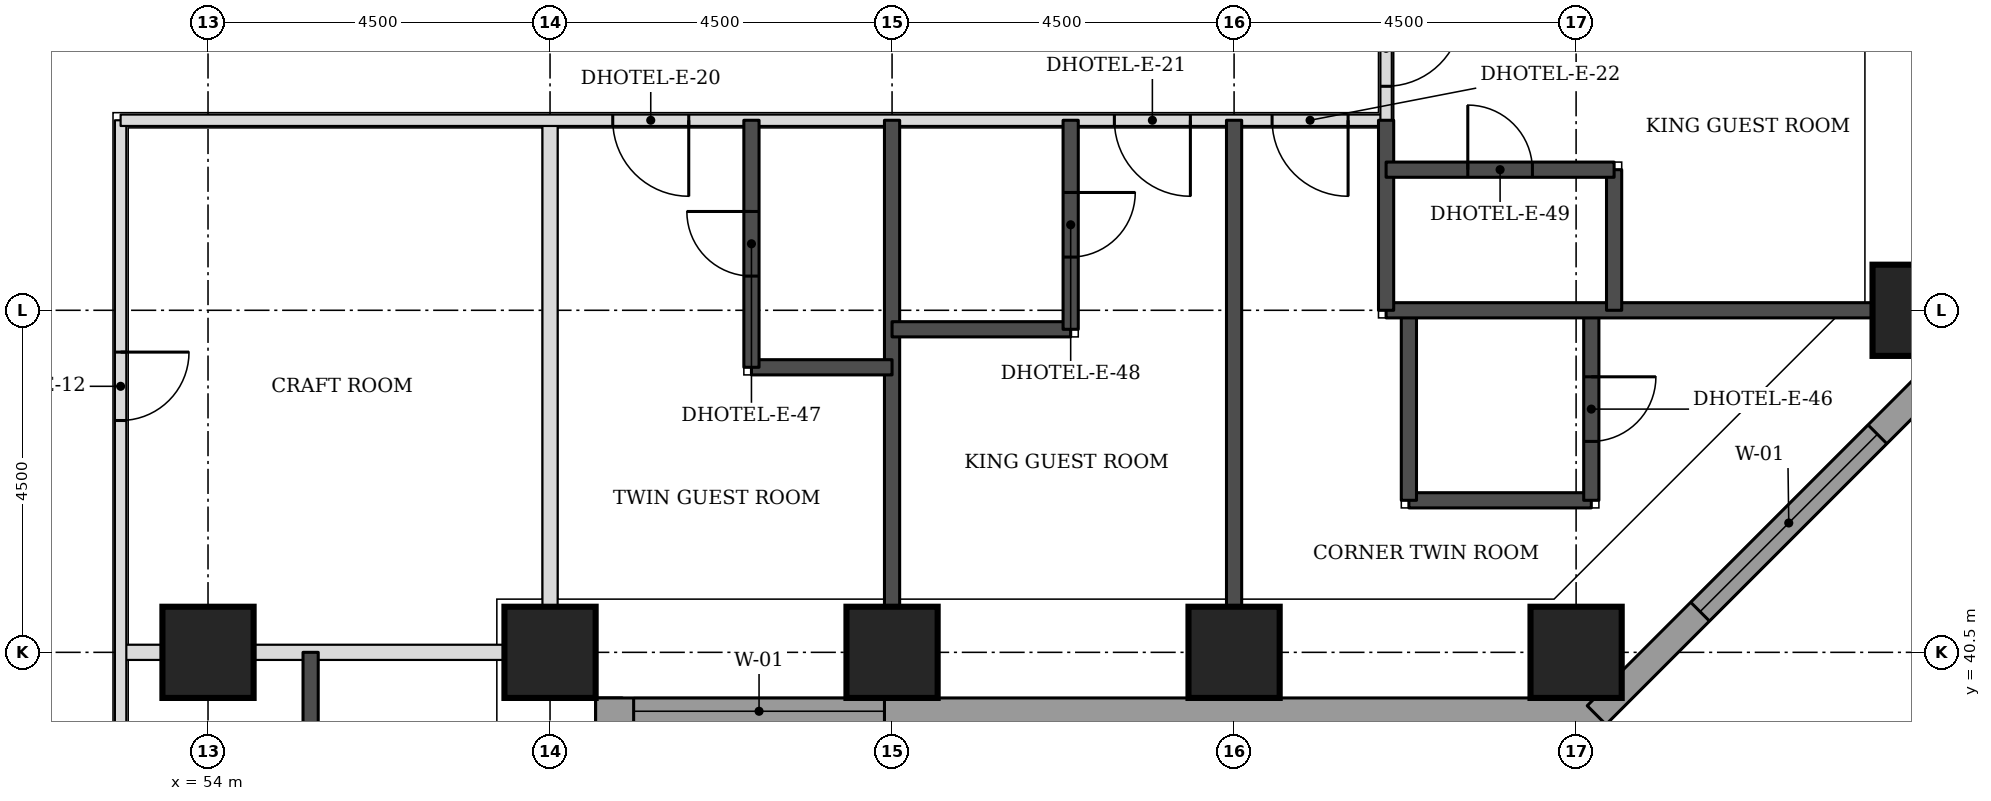
"""IFC4 building model, lengths in metres.
Left out: names, types, materials, properties, quantities, classifications, styles, units other than length and angle.
Written with IfcOpenShell. Run it as: python <this file> out.ifc"""

import sys

from ifc_helpers import new_model, si_unit, direction, frame, frame_2d, origin, origin_2d, place, context, subcontext, project, spatial, rectangle, extrude, element, fill, save


model = new_model("IFC4")
c1 = context("Model", 3, precision=1e-05, world=origin(), true_north=direction((0.0, 1.0)))
c2 = subcontext(c1, "Body", "Model", "MODEL_VIEW")
j1 = project(units=[si_unit("LENGTHUNIT", "METRE"), si_unit("PLANEANGLEUNIT", "RADIAN")], contexts=[c1])
p1 = place(None, origin())
s1 = spatial("IfcSite", under=j1, at=p1, CompositionType="ELEMENT")
p2 = place(p1, origin())
s2 = spatial("IfcBuilding", under=s1, at=p2, CompositionType="ELEMENT")
p3 = place(p2, frame((0.0, 0.0, 62.7)))
s3 = spatial("IfcBuildingStorey", under=s2, at=p3, CompositionType="ELEMENT", Elevation=62.7)
for number, where, z_axis, x_axis in (
    (1, (54.0, 40.5, 0.0), (0.0, 0.0, 1.0), (1.0, 0.0, 0.0)),
    (2, (58.5, 40.5, 0.0), (0.0, 0.0, 1.0), (1.0, 0.0, 0.0)),
    (3, (63.0, 40.5, 0.0), (0.0, 0.0, 1.0), (1.0, 0.0, 0.0)),
    (4, (67.5, 40.5, 0.0), (0.0, 0.0, 1.0), (1.0, 0.0, 0.0)),
    (5, (72.0, 40.5, 0.0), (0.0, 0.0, 1.0), (1.0, 0.0, 0.0)),
    (6, (76.5, 45.0, 0.0), (0.0, 0.0, 1.0), (1.0, 0.0, 0.0)),
):
    element("IfcColumn", number, at=place(p3, frame(where, z_axis=z_axis, x_axis=x_axis)), inside=s3, PredefinedType="COLUMN", context=c2, shape_type="SweptSolid", body=[
        extrude(rectangle(XDim=1.2, YDim=1.2, at=origin_2d()), origin(), (0.0, 0.0, 1.0), 3.3),
    ])
p4 = place(p3, frame((59.275, 22.106, 0.0), z_axis=(0.0, 0.0, 1.0), x_axis=(0.0, 1.0, 0.0)))
e7 = element("IfcWall", 7, at=p4, inside=s3, PredefinedType="STANDARD", context=c2, shape_type="SweptSolid", body=[
    extrude(rectangle(XDim=17.793, YDim=0.35, at=frame_2d((8.897, 0.0))), origin(), (0.0, 0.0, 1.0), 3.055),
])
p5 = place(p4, frame((5.493, 0.0, 0.8)))
e8 = element("IfcOpeningElement", 8, at=p5, cuts=e7, PredefinedType="OPENING", context=c2, shape_type="SweptSolid", body=[
    extrude(rectangle(XDim=3.3, YDim=1.5, at=frame_2d((1.65, 0.75))), frame((0.0, 0.185, 0.0), z_axis=(0.0, -1.0, 0.0), x_axis=(1.0, 0.0, 0.0)), (0.0, 0.0, 1.0), 0.37),
])
p6 = place(p4, frame((13.993, 0.0, 0.8)))
e9 = element("IfcOpeningElement", 9, at=p6, cuts=e7, PredefinedType="OPENING", context=c2, shape_type="SweptSolid", body=[
    extrude(rectangle(XDim=3.3, YDim=1.5, at=frame_2d((1.65, 0.75))), frame((0.0, 0.185, 0.0), z_axis=(0.0, -1.0, 0.0), x_axis=(1.0, 0.0, 0.0)), (0.0, 0.0, 1.0), 0.37),
])
p7 = place(p3, frame((59.1, 39.725, 0.0), z_axis=(0.0, 0.0, 1.0), x_axis=(1.0, 0.0, 0.0)))
e10 = element("IfcWall", 10, at=p7, inside=s3, PredefinedType="STANDARD", context=c2, shape_type="SweptSolid", body=[
    extrude(rectangle(XDim=13.293, YDim=0.35, at=frame_2d((6.647, 0.0))), origin(), (0.0, 0.0, 1.0), 3.055),
])
p8 = place(p7, frame((0.5, 0.0, 0.8)))
e11 = element("IfcOpeningElement", 11, at=p8, cuts=e10, PredefinedType="OPENING", context=c2, shape_type="SweptSolid", body=[
    extrude(rectangle(XDim=3.3, YDim=1.5, at=frame_2d((1.65, 0.75))), frame((0.0, 0.185, 0.0), z_axis=(0.0, -1.0, 0.0), x_axis=(1.0, 0.0, 0.0)), (0.0, 0.0, 1.0), 0.37),
])
p9 = place(p3, frame((72.27, 39.674, 0.0), z_axis=(0.0, 0.0, 1.0), x_axis=(0.707106781187, 0.707106781187, 0.0)))
e12 = element("IfcWall", 12, at=p9, inside=s3, PredefinedType="STANDARD", context=c2, shape_type="SweptSolid", body=[
    extrude(rectangle(XDim=7.151, YDim=0.35, at=frame_2d((3.576, 0.0))), origin(), (0.0, 0.0, 1.0), 3.055),
])
p10 = place(p9, frame((1.926, 0.0, 0.8)))
e13 = element("IfcOpeningElement", 13, at=p10, cuts=e12, PredefinedType="OPENING", context=c2, shape_type="SweptSolid", body=[
    extrude(rectangle(XDim=3.3, YDim=1.5, at=frame_2d((1.65, 0.75))), frame((0.0, 0.185, 0.0), z_axis=(0.0, -1.0, 0.0), x_axis=(1.0, 0.0, 0.0)), (0.0, 0.0, 1.0), 0.37),
])
p11 = place(p3, frame((52.85, 40.5, 0.0), z_axis=(0.0, 0.0, 1.0), x_axis=(1.0, 0.0, 0.0)))
e14 = element("IfcWall", 14, at=p11, inside=s3, PredefinedType="PARTITIONING", context=c2, shape_type="SweptSolid", body=[
    extrude(rectangle(XDim=5.05, YDim=0.2, at=frame_2d((2.525, 0.0))), origin(), (0.0, 0.0, 1.0), 2.33),
])
p12 = place(p3, frame((58.5, 41.1, 0.0), z_axis=(0.0, 0.0, 1.0), x_axis=(0.0, 1.0, 0.0)))
e15 = element("IfcWall", 15, at=p12, inside=s3, PredefinedType="PARTITIONING", context=c2, shape_type="SweptSolid", body=[
    extrude(rectangle(XDim=6.4, YDim=0.2, at=frame_2d((3.2, 0.0))), origin(), (0.0, 0.0, 1.0), 3.08),
])
p13 = place(p3, frame((52.85, 25.15, 0.0), z_axis=(0.0, 0.0, 1.0), x_axis=(0.0, 1.0, 0.0)))
e16 = element("IfcWall", 16, at=p13, inside=s3, PredefinedType="PARTITIONING", context=c2, shape_type="SweptSolid", body=[
    extrude(rectangle(XDim=22.35, YDim=0.15, at=frame_2d((11.175, 0.0))), origin(), (0.0, 0.0, 1.0), 3.08),
])
p14 = place(p13, frame((0.347, 0.0, 0.0)))
e17 = element("IfcOpeningElement", 17, at=p14, cuts=e16, PredefinedType="OPENING", context=c2, shape_type="SweptSolid", body=[
    extrude(rectangle(XDim=1.0, YDim=2.1, at=frame_2d((0.5, 1.05))), frame((0.0, 0.085, 0.0), z_axis=(0.0, -1.0, 0.0), x_axis=(1.0, 0.0, 0.0)), (0.0, 0.0, 1.0), 0.17),
])
p15 = place(p13, frame((7.325, 0.0, 0.0)))
e18 = element("IfcOpeningElement", 18, at=p15, cuts=e16, PredefinedType="OPENING", context=c2, shape_type="SweptSolid", body=[
    extrude(rectangle(XDim=1.0, YDim=2.1, at=frame_2d((0.5, 1.05))), frame((0.0, 0.085, 0.0), z_axis=(0.0, -1.0, 0.0), x_axis=(1.0, 0.0, 0.0)), (0.0, 0.0, 1.0), 0.17),
])
p16 = place(p13, frame((11.675, 0.0, 0.0)))
e19 = element("IfcOpeningElement", 19, at=p16, cuts=e16, PredefinedType="OPENING", context=c2, shape_type="SweptSolid", body=[
    extrude(rectangle(XDim=1.0, YDim=2.1, at=frame_2d((0.5, 1.05))), frame((0.0, 0.085, 0.0), z_axis=(0.0, -1.0, 0.0), x_axis=(1.0, 0.0, 0.0)), (0.0, 0.0, 1.0), 0.17),
])
p17 = place(p13, frame((18.4, 0.0, 0.0)))
e20 = element("IfcOpeningElement", 20, at=p17, cuts=e16, PredefinedType="OPENING", context=c2, shape_type="SweptSolid", body=[
    extrude(rectangle(XDim=0.9, YDim=2.1, at=frame_2d((0.45, 1.05))), frame((0.0, 0.085, 0.0), z_axis=(0.0, -1.0, 0.0), x_axis=(1.0, 0.0, 0.0)), (0.0, 0.0, 1.0), 0.17),
])
p18 = place(p3, frame((52.85, 47.5, 0.0), z_axis=(0.0, 0.0, 1.0), x_axis=(1.0, 0.0, 0.0)))
e21 = element("IfcWall", 21, at=p18, inside=s3, PredefinedType="PARTITIONING", context=c2, shape_type="SweptSolid", body=[
    extrude(rectangle(XDim=16.65, YDim=0.15, at=frame_2d((8.325, 0.0))), origin(), (0.0, 0.0, 1.0), 3.08),
])
p19 = place(p18, frame((13.075, 0.0, 0.0)))
e22 = element("IfcOpeningElement", 22, at=p19, cuts=e21, PredefinedType="OPENING", context=c2, shape_type="SweptSolid", body=[
    extrude(rectangle(XDim=1.0, YDim=2.1, at=frame_2d((0.5, 1.05))), frame((0.0, 0.085, 0.0), z_axis=(0.0, -1.0, 0.0), x_axis=(1.0, 0.0, 0.0)), (0.0, 0.0, 1.0), 0.17),
])
p20 = place(p18, frame((6.475, 0.0, 0.0)))
e23 = element("IfcOpeningElement", 23, at=p20, cuts=e21, PredefinedType="OPENING", context=c2, shape_type="SweptSolid", body=[
    extrude(rectangle(XDim=1.0, YDim=2.1, at=frame_2d((0.5, 1.05))), frame((0.0, 0.085, 0.0), z_axis=(0.0, -1.0, 0.0), x_axis=(1.0, 0.0, 0.0)), (0.0, 0.0, 1.0), 0.17),
])
p21 = place(p18, frame((15.15, 0.0, 0.0)))
e24 = element("IfcOpeningElement", 24, at=p21, cuts=e21, PredefinedType="OPENING", context=c2, shape_type="SweptSolid", body=[
    extrude(rectangle(XDim=1.0, YDim=2.1, at=frame_2d((0.5, 1.05))), frame((0.0, 0.085, 0.0), z_axis=(0.0, -1.0, 0.0), x_axis=(1.0, 0.0, 0.0)), (0.0, 0.0, 1.0), 0.17),
])
p22 = place(p3, frame((69.5, 47.5, 0.0), z_axis=(0.0, 0.0, 1.0), x_axis=(0.0, 1.0, 0.0)))
e25 = element("IfcWall", 25, at=p22, inside=s3, PredefinedType="PARTITIONING", context=c2, shape_type="SweptSolid", body=[
    extrude(rectangle(XDim=26.5, YDim=0.15, at=frame_2d((13.25, 0.0))), origin(), (0.0, 0.0, 1.0), 3.08),
])
p23 = place(p22, frame((25.053, 0.0, 0.0)))
e26 = element("IfcOpeningElement", 26, at=p23, cuts=e25, PredefinedType="OPENING", context=c2, shape_type="SweptSolid", body=[
    extrude(rectangle(XDim=1.0, YDim=2.1, at=frame_2d((0.5, 1.05))), frame((0.0, 0.085, 0.0), z_axis=(0.0, -1.0, 0.0), x_axis=(1.0, 0.0, 0.0)), (0.0, 0.0, 1.0), 0.17),
])
p24 = place(p22, frame((13.775, 0.0, 0.0)))
e27 = element("IfcOpeningElement", 27, at=p24, cuts=e25, PredefinedType="OPENING", context=c2, shape_type="SweptSolid", body=[
    extrude(rectangle(XDim=1.0, YDim=2.1, at=frame_2d((0.5, 1.05))), frame((0.0, 0.085, 0.0), z_axis=(0.0, -1.0, 0.0), x_axis=(1.0, 0.0, 0.0)), (0.0, 0.0, 1.0), 0.17),
])
p25 = place(p22, frame((7.65, 0.0, 0.0)))
e28 = element("IfcOpeningElement", 28, at=p25, cuts=e25, PredefinedType="OPENING", context=c2, shape_type="SweptSolid", body=[
    extrude(rectangle(XDim=1.1, YDim=2.1, at=frame_2d((0.55, 1.05))), frame((0.0, 0.085, 0.0), z_axis=(0.0, -1.0, 0.0), x_axis=(1.0, 0.0, 0.0)), (0.0, 0.0, 1.0), 0.17),
])
p26 = place(p22, frame((0.447, 0.0, 0.0)))
e29 = element("IfcOpeningElement", 29, at=p26, cuts=e25, PredefinedType="OPENING", context=c2, shape_type="SweptSolid", body=[
    extrude(rectangle(XDim=1.0, YDim=2.1, at=frame_2d((0.5, 1.05))), frame((0.0, 0.085, 0.0), z_axis=(0.0, -1.0, 0.0), x_axis=(1.0, 0.0, 0.0)), (0.0, 0.0, 1.0), 0.17),
])
p27 = place(p3, frame((55.35, 38.65, 0.0), z_axis=(0.0, 0.0, 1.0), x_axis=(0.0, 1.0, 0.0)))
e30 = element("IfcWall", 30, at=p27, inside=s3, PredefinedType="SOLIDWALL", context=c2, shape_type="SweptSolid", body=[
    extrude(rectangle(XDim=1.85, YDim=0.2, at=frame_2d((0.925, 0.0))), origin(), (0.0, 0.0, 1.0), 3.08),
])
for number, where, z_axis, x_axis in (
    (31, (63.0, 41.1, 0.0), (0.0, 0.0, 1.0), (0.0, 1.0, 0.0)),
    (32, (67.5, 41.1, 0.0), (0.0, 0.0, 1.0), (0.0, 1.0, 0.0)),
):
    element("IfcWall", number, at=place(p3, frame(where, z_axis=z_axis, x_axis=x_axis)), inside=s3, PredefinedType="SOLIDWALL", context=c2, shape_type="SweptSolid", body=[
        extrude(rectangle(XDim=6.4, YDim=0.2, at=frame_2d((3.2, 0.0))), origin(), (0.0, 0.0, 1.0), 3.08),
    ])
p28 = place(p3, frame((69.8, 42.5, 0.0), z_axis=(0.0, 0.0, 1.0), x_axis=(1.0, 0.0, 0.0)))
e33 = element("IfcWall", 33, at=p28, inside=s3, PredefinedType="SOLIDWALL", context=c2, shape_type="SweptSolid", body=[
    extrude(rectangle(XDim=2.4, YDim=0.2, at=frame_2d((1.2, 0.0))), origin(), (0.0, 0.0, 1.0), 3.08),
])
p29 = place(p3, frame((69.8, 42.5, 0.0), z_axis=(0.0, 0.0, 1.0), x_axis=(0.0, 1.0, 0.0)))
e34 = element("IfcWall", 34, at=p29, inside=s3, PredefinedType="SOLIDWALL", context=c2, shape_type="SweptSolid", body=[
    extrude(rectangle(XDim=2.5, YDim=0.2, at=frame_2d((1.25, 0.0))), origin(), (0.0, 0.0, 1.0), 3.08),
])
p30 = place(p3, frame((72.2, 42.5, 0.0), z_axis=(0.0, 0.0, 1.0), x_axis=(0.0, 1.0, 0.0)))
e35 = element("IfcWall", 35, at=p30, inside=s3, PredefinedType="SOLIDWALL", context=c2, shape_type="SweptSolid", body=[
    extrude(rectangle(XDim=2.5, YDim=0.2, at=frame_2d((1.25, 0.0))), origin(), (0.0, 0.0, 1.0), 3.08),
])
p31 = place(p30, frame((0.775, 0.0, 0.0)))
e36 = element("IfcOpeningElement", 36, at=p31, cuts=e35, PredefinedType="OPENING", context=c2, shape_type="SweptSolid", body=[
    extrude(rectangle(XDim=0.85, YDim=2.1, at=frame_2d((0.425, 1.05))), frame((0.0, 0.11, 0.0), z_axis=(0.0, -1.0, 0.0), x_axis=(1.0, 0.0, 0.0)), (0.0, 0.0, 1.0), 0.22),
])
p32 = place(p3, frame((61.15, 44.25, 0.0), z_axis=(0.0, 0.0, 1.0), x_axis=(1.0, 0.0, 0.0)))
e37 = element("IfcWall", 37, at=p32, inside=s3, PredefinedType="SOLIDWALL", context=c2, shape_type="SweptSolid", body=[
    extrude(rectangle(XDim=1.85, YDim=0.2, at=frame_2d((0.925, 0.0))), origin(), (0.0, 0.0, 1.0), 3.08),
])
p33 = place(p3, frame((61.15, 44.25, 0.0), z_axis=(0.0, 0.0, 1.0), x_axis=(0.0, 1.0, 0.0)))
e38 = element("IfcWall", 38, at=p33, inside=s3, PredefinedType="SOLIDWALL", context=c2, shape_type="SweptSolid", body=[
    extrude(rectangle(XDim=3.25, YDim=0.2, at=frame_2d((1.625, 0.0))), origin(), (0.0, 0.0, 1.0), 3.08),
])
p34 = place(p33, frame((1.2, 0.0, 0.0)))
e39 = element("IfcOpeningElement", 39, at=p34, cuts=e38, PredefinedType="OPENING", context=c2, shape_type="SweptSolid", body=[
    extrude(rectangle(XDim=0.85, YDim=2.1, at=frame_2d((0.425, 1.05))), frame((0.0, 0.11, 0.0), z_axis=(0.0, -1.0, 0.0), x_axis=(1.0, 0.0, 0.0)), (0.0, 0.0, 1.0), 0.22),
])
p35 = place(p3, frame((63.0, 44.75, 0.0), z_axis=(0.0, 0.0, 1.0), x_axis=(1.0, 0.0, 0.0)))
e40 = element("IfcWall", 40, at=p35, inside=s3, PredefinedType="SOLIDWALL", context=c2, shape_type="SweptSolid", body=[
    extrude(rectangle(XDim=2.35, YDim=0.2, at=frame_2d((1.175, 0.0))), origin(), (0.0, 0.0, 1.0), 3.08),
])
p36 = place(p3, frame((65.35, 44.75, 0.0), z_axis=(0.0, 0.0, 1.0), x_axis=(0.0, 1.0, 0.0)))
e41 = element("IfcWall", 41, at=p36, inside=s3, PredefinedType="SOLIDWALL", context=c2, shape_type="SweptSolid", body=[
    extrude(rectangle(XDim=2.75, YDim=0.2, at=frame_2d((1.375, 0.0))), origin(), (0.0, 0.0, 1.0), 3.08),
])
p37 = place(p36, frame((0.95, 0.0, 0.0)))
e42 = element("IfcOpeningElement", 42, at=p37, cuts=e41, PredefinedType="OPENING", context=c2, shape_type="SweptSolid", body=[
    extrude(rectangle(XDim=0.85, YDim=2.1, at=frame_2d((0.425, 1.05))), frame((0.0, 0.11, 0.0), z_axis=(0.0, -1.0, 0.0), x_axis=(1.0, 0.0, 0.0)), (0.0, 0.0, 1.0), 0.22),
])
p38 = place(p3, frame((69.5, 45.0, 0.0), z_axis=(0.0, 0.0, 1.0), x_axis=(1.0, 0.0, 0.0)))
e43 = element("IfcWall", 43, at=p38, inside=s3, PredefinedType="SOLIDWALL", context=c2, shape_type="SweptSolid", body=[
    extrude(rectangle(XDim=6.4, YDim=0.2, at=frame_2d((3.2, 0.0))), origin(), (0.0, 0.0, 1.0), 3.08),
])
p39 = place(p3, frame((69.5, 45.0, 0.0), z_axis=(0.0, 0.0, 1.0), x_axis=(0.0, 1.0, 0.0)))
e44 = element("IfcWall", 44, at=p39, inside=s3, PredefinedType="SOLIDWALL", context=c2, shape_type="SweptSolid", body=[
    extrude(rectangle(XDim=2.5, YDim=0.2, at=frame_2d((1.25, 0.0))), origin(), (0.0, 0.0, 1.0), 3.08),
])
p40 = place(p3, frame((72.5, 45.0, 0.0), z_axis=(0.0, 0.0, 1.0), x_axis=(0.0, 1.0, 0.0)))
e45 = element("IfcWall", 45, at=p40, inside=s3, PredefinedType="SOLIDWALL", context=c2, shape_type="SweptSolid", body=[
    extrude(rectangle(XDim=1.85, YDim=0.2, at=frame_2d((0.925, 0.0))), origin(), (0.0, 0.0, 1.0), 3.08),
])
p41 = place(p3, frame((69.5, 46.85, 0.0), z_axis=(0.0, 0.0, 1.0), x_axis=(1.0, 0.0, 0.0)))
e46 = element("IfcWall", 46, at=p41, inside=s3, PredefinedType="SOLIDWALL", context=c2, shape_type="SweptSolid", body=[
    extrude(rectangle(XDim=3.0, YDim=0.2, at=frame_2d((1.5, 0.0))), origin(), (0.0, 0.0, 1.0), 3.08),
])
p42 = place(p41, frame((1.075, 0.0, 0.0)))
e47 = element("IfcOpeningElement", 47, at=p42, cuts=e46, PredefinedType="OPENING", context=c2, shape_type="SweptSolid", body=[
    extrude(rectangle(XDim=0.85, YDim=2.1, at=frame_2d((0.425, 1.05))), frame((0.0, 0.11, 0.0), z_axis=(0.0, -1.0, 0.0), x_axis=(1.0, 0.0, 0.0)), (0.0, 0.0, 1.0), 0.22),
])
p43 = place(p8, origin())
e48 = element("IfcWindow", 48, at=p43, inside=s3, PartitioningType="SINGLE_PANEL", PredefinedType="WINDOW", context=c2, shape_type="SweptSolid", body=[
    extrude(rectangle(XDim=3.3, YDim=1.5, at=frame_2d((1.65, 0.75))), frame((0.0, 0.085, 0.0), z_axis=(0.0, -1.0, 0.0), x_axis=(1.0, 0.0, 0.0)), (0.0, 0.0, 1.0), 0.06),
])
fill(e11, e48)
p44 = place(p10, origin())
e49 = element("IfcWindow", 49, at=p44, inside=s3, PartitioningType="SINGLE_PANEL", PredefinedType="WINDOW", context=c2, shape_type="SweptSolid", body=[
    extrude(rectangle(XDim=3.3, YDim=1.5, at=frame_2d((1.65, 0.75))), frame((0.0, 0.085, 0.0), z_axis=(0.0, -1.0, 0.0), x_axis=(1.0, 0.0, 0.0)), (0.0, 0.0, 1.0), 0.06),
])
fill(e13, e49)
p45 = place(p26, frame((1.0, 0.0, 0.0), z_axis=(0.0, 0.0, 1.0), x_axis=(-1.0, 0.0, 0.0)))
e50 = element("IfcDoor", 50, at=p45, inside=s3, OperationType="SINGLE_SWING_LEFT", PredefinedType="DOOR", context=c2, shape_type="SweptSolid", body=[
    extrude(rectangle(XDim=1.0, YDim=2.1, at=frame_2d((0.5, 1.05))), frame((0.0, 0.025, 0.0), z_axis=(0.0, -1.0, 0.0), x_axis=(1.0, 0.0, 0.0)), (0.0, 0.0, 1.0), 0.05),
])
fill(e29, e50)
p46 = place(p42, origin())
e51 = element("IfcDoor", 51, at=p46, inside=s3, OperationType="SINGLE_SWING_LEFT", PredefinedType="DOOR", context=c2, shape_type="SweptSolid", body=[
    extrude(rectangle(XDim=0.85, YDim=2.1, at=frame_2d((0.425, 1.05))), frame((0.0, 0.025, 0.0), z_axis=(0.0, -1.0, 0.0), x_axis=(1.0, 0.0, 0.0)), (0.0, 0.0, 1.0), 0.05),
])
fill(e47, e51)
p47 = place(p19, frame((1.0, 0.0, 0.0), z_axis=(0.0, 0.0, 1.0), x_axis=(-1.0, 0.0, 0.0)))
e52 = element("IfcDoor", 52, at=p47, inside=s3, OperationType="SINGLE_SWING_LEFT", PredefinedType="DOOR", context=c2, shape_type="SweptSolid", body=[
    extrude(rectangle(XDim=1.0, YDim=2.1, at=frame_2d((0.5, 1.05))), frame((0.0, 0.025, 0.0), z_axis=(0.0, -1.0, 0.0), x_axis=(1.0, 0.0, 0.0)), (0.0, 0.0, 1.0), 0.05),
])
fill(e22, e52)
p48 = place(p37, frame((0.85, 0.0, 0.0), z_axis=(0.0, 0.0, 1.0), x_axis=(-1.0, 0.0, 0.0)))
e53 = element("IfcDoor", 53, at=p48, inside=s3, OperationType="SINGLE_SWING_LEFT", PredefinedType="DOOR", context=c2, shape_type="SweptSolid", body=[
    extrude(rectangle(XDim=0.85, YDim=2.1, at=frame_2d((0.425, 1.05))), frame((0.0, 0.025, 0.0), z_axis=(0.0, -1.0, 0.0), x_axis=(1.0, 0.0, 0.0)), (0.0, 0.0, 1.0), 0.05),
])
fill(e42, e53)
p49 = place(p20, frame((1.0, 0.0, 0.0), z_axis=(0.0, 0.0, 1.0), x_axis=(-1.0, 0.0, 0.0)))
e54 = element("IfcDoor", 54, at=p49, inside=s3, OperationType="SINGLE_SWING_LEFT", PredefinedType="DOOR", context=c2, shape_type="SweptSolid", body=[
    extrude(rectangle(XDim=1.0, YDim=2.1, at=frame_2d((0.5, 1.05))), frame((0.0, 0.025, 0.0), z_axis=(0.0, -1.0, 0.0), x_axis=(1.0, 0.0, 0.0)), (0.0, 0.0, 1.0), 0.05),
])
fill(e23, e54)
p50 = place(p34, origin())
e55 = element("IfcDoor", 55, at=p50, inside=s3, OperationType="SINGLE_SWING_RIGHT", PredefinedType="DOOR", context=c2, shape_type="SweptSolid", body=[
    extrude(rectangle(XDim=0.85, YDim=2.1, at=frame_2d((0.425, 1.05))), frame((0.0, 0.025, 0.0), z_axis=(0.0, -1.0, 0.0), x_axis=(1.0, 0.0, 0.0)), (0.0, 0.0, 1.0), 0.05),
])
fill(e39, e55)
p51 = place(p21, frame((1.0, 0.0, 0.0), z_axis=(0.0, 0.0, 1.0), x_axis=(-1.0, 0.0, 0.0)))
e56 = element("IfcDoor", 56, at=p51, inside=s3, OperationType="SINGLE_SWING_LEFT", PredefinedType="DOOR", context=c2, shape_type="SweptSolid", body=[
    extrude(rectangle(XDim=1.0, YDim=2.1, at=frame_2d((0.5, 1.05))), frame((0.0, 0.025, 0.0), z_axis=(0.0, -1.0, 0.0), x_axis=(1.0, 0.0, 0.0)), (0.0, 0.0, 1.0), 0.05),
])
fill(e24, e56)
p52 = place(p31, frame((0.85, 0.0, 0.0), z_axis=(0.0, 0.0, 1.0), x_axis=(-1.0, 0.0, 0.0)))
e57 = element("IfcDoor", 57, at=p52, inside=s3, OperationType="SINGLE_SWING_LEFT", PredefinedType="DOOR", context=c2, shape_type="SweptSolid", body=[
    extrude(rectangle(XDim=0.85, YDim=2.1, at=frame_2d((0.425, 1.05))), frame((0.0, 0.025, 0.0), z_axis=(0.0, -1.0, 0.0), x_axis=(1.0, 0.0, 0.0)), (0.0, 0.0, 1.0), 0.05),
])
fill(e36, e57)
p53 = place(p17, frame((0.9, 0.0, 0.0), z_axis=(0.0, 0.0, 1.0), x_axis=(-1.0, 0.0, 0.0)))
e58 = element("IfcDoor", 58, at=p53, inside=s3, OperationType="SINGLE_SWING_LEFT", PredefinedType="DOOR", context=c2, shape_type="SweptSolid", body=[
    extrude(rectangle(XDim=0.9, YDim=2.1, at=frame_2d((0.45, 1.05))), frame((0.0, 0.025, 0.0), z_axis=(0.0, -1.0, 0.0), x_axis=(1.0, 0.0, 0.0)), (0.0, 0.0, 1.0), 0.05),
])
fill(e20, e58)
save(model, sys.argv[1])
